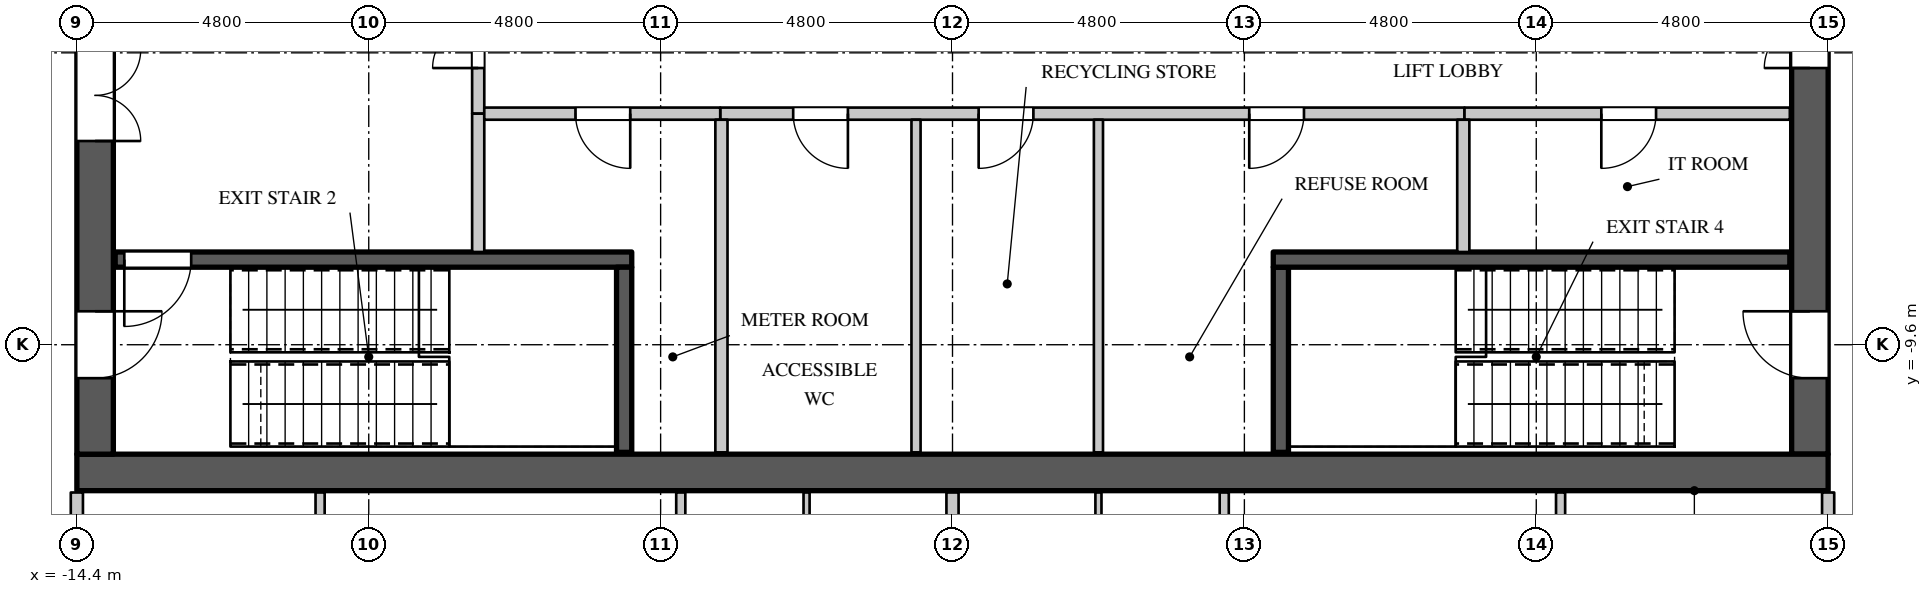
"""IFC4 building model, lengths in metres.
Left out: names, types, materials, properties, quantities, classifications, styles, units other than length and angle.
Written with IfcOpenShell. Run it as: python <this file> out.ifc"""

import sys

from ifc_helpers import new_model, si_unit, direction, frame, frame_2d, origin, place, context, subcontext, project, spatial, rectangle, extrude, element, fill, save


model = new_model("IFC4")
c1 = context("Model", 3, precision=1e-05, world=origin(), true_north=direction((0.0, 1.0)))
c2 = subcontext(c1, "Body", "Model", "MODEL_VIEW")
j1 = project(units=[si_unit("LENGTHUNIT", "METRE"), si_unit("PLANEANGLEUNIT", "RADIAN")], contexts=[c1])
p1 = place(None, origin())
s1 = spatial("IfcSite", under=j1, at=p1, CompositionType="ELEMENT")
p2 = place(p1, origin())
s2 = spatial("IfcBuilding", under=s1, at=p2, CompositionType="ELEMENT")
p3 = place(p2, frame((0.0, 0.0, 306.3)))
s3 = spatial("IfcBuildingStorey", under=s2, at=p3, CompositionType="ELEMENT", Elevation=306.3)
p4 = place(p3, frame((-14.4, -11.7, 0.0), z_axis=(0.0, 0.0, 1.0), x_axis=(1.0, 0.0, 0.0)))
e1 = element("IfcWall", 1, at=p4, inside=s3, PredefinedType="SHEAR", context=c2, shape_type="SweptSolid", body=[
    extrude(rectangle(XDim=28.8, YDim=0.6, at=frame_2d((14.4, 0.0))), origin(), (0.0, 0.0, 1.0), 4.2),
])
p5 = place(p3, frame((14.1, -11.4, 0.0), z_axis=(0.0, 0.0, 1.0), x_axis=(0.0, 1.0, 0.0)))
e2 = element("IfcWall", 2, at=p5, inside=s3, PredefinedType="SHEAR", context=c2, shape_type="SweptSolid", body=[
    extrude(rectangle(XDim=22.8, YDim=0.6, at=frame_2d((11.4, 0.0))), origin(), (0.0, 0.0, 1.0), 4.2),
])
p6 = place(p5, frame((20.45, 0.0, 0.0)))
e3 = element("IfcOpeningElement", 3, at=p6, cuts=e2, PredefinedType="OPENING", context=c2, shape_type="SweptSolid", body=[
    extrude(rectangle(XDim=1.1, YDim=2.2, at=frame_2d((0.55, 1.1))), frame((0.0, 0.31, 0.0), z_axis=(0.0, -1.0, 0.0), x_axis=(1.0, 0.0, 0.0)), (0.0, 0.0, 1.0), 0.62),
])
p7 = place(p5, frame((1.25, 0.0, 0.0)))
e4 = element("IfcOpeningElement", 4, at=p7, cuts=e2, PredefinedType="OPENING", context=c2, shape_type="SweptSolid", body=[
    extrude(rectangle(XDim=1.1, YDim=2.2, at=frame_2d((0.55, 1.1))), frame((0.0, 0.31, 0.0), z_axis=(0.0, -1.0, 0.0), x_axis=(1.0, 0.0, 0.0)), (0.0, 0.0, 1.0), 0.62),
])
p8 = place(p5, frame((14.95, 0.0, 0.0)))
e5 = element("IfcOpeningElement", 5, at=p8, cuts=e2, PredefinedType="OPENING", context=c2, shape_type="SweptSolid", body=[
    extrude(rectangle(XDim=1.5, YDim=2.4, at=frame_2d((0.75, 1.2))), frame((0.0, 0.31, 0.0), z_axis=(0.0, -1.0, 0.0), x_axis=(1.0, 0.0, 0.0)), (0.0, 0.0, 1.0), 0.62),
])
p9 = place(p5, frame((6.35, 0.0, 0.0)))
e6 = element("IfcOpeningElement", 6, at=p9, cuts=e2, PredefinedType="OPENING", context=c2, shape_type="SweptSolid", body=[
    extrude(rectangle(XDim=1.5, YDim=2.4, at=frame_2d((0.75, 1.2))), frame((0.0, 0.31, 0.0), z_axis=(0.0, -1.0, 0.0), x_axis=(1.0, 0.0, 0.0)), (0.0, 0.0, 1.0), 0.62),
])
p10 = place(p3, frame((-14.1, -11.4, 0.0), z_axis=(0.0, 0.0, 1.0), x_axis=(0.0, 1.0, 0.0)))
e7 = element("IfcWall", 7, at=p10, inside=s3, PredefinedType="SHEAR", context=c2, shape_type="SweptSolid", body=[
    extrude(rectangle(XDim=22.8, YDim=0.6, at=frame_2d((11.4, 0.0))), origin(), (0.0, 0.0, 1.0), 4.2),
])
p11 = place(p10, frame((20.45, 0.0, 0.0)))
e8 = element("IfcOpeningElement", 8, at=p11, cuts=e7, PredefinedType="OPENING", context=c2, shape_type="SweptSolid", body=[
    extrude(rectangle(XDim=1.1, YDim=2.2, at=frame_2d((0.55, 1.1))), frame((0.0, 0.31, 0.0), z_axis=(0.0, -1.0, 0.0), x_axis=(1.0, 0.0, 0.0)), (0.0, 0.0, 1.0), 0.62),
])
p12 = place(p10, frame((1.25, 0.0, 0.0)))
e9 = element("IfcOpeningElement", 9, at=p12, cuts=e7, PredefinedType="OPENING", context=c2, shape_type="SweptSolid", body=[
    extrude(rectangle(XDim=1.1, YDim=2.2, at=frame_2d((0.55, 1.1))), frame((0.0, 0.31, 0.0), z_axis=(0.0, -1.0, 0.0), x_axis=(1.0, 0.0, 0.0)), (0.0, 0.0, 1.0), 0.62),
])
p13 = place(p10, frame((16.15, 0.0, 0.0)))
e10 = element("IfcOpeningElement", 10, at=p13, cuts=e7, PredefinedType="OPENING", context=c2, shape_type="SweptSolid", body=[
    extrude(rectangle(XDim=1.5, YDim=2.4, at=frame_2d((0.75, 1.2))), frame((0.0, 0.31, 0.0), z_axis=(0.0, -1.0, 0.0), x_axis=(1.0, 0.0, 0.0)), (0.0, 0.0, 1.0), 0.62),
])
p14 = place(p10, frame((5.15, 0.0, 0.0)))
e11 = element("IfcOpeningElement", 11, at=p14, cuts=e7, PredefinedType="OPENING", context=c2, shape_type="SweptSolid", body=[
    extrude(rectangle(XDim=1.5, YDim=2.4, at=frame_2d((0.75, 1.2))), frame((0.0, 0.31, 0.0), z_axis=(0.0, -1.0, 0.0), x_axis=(1.0, 0.0, 0.0)), (0.0, 0.0, 1.0), 0.62),
])
p15 = place(p3, frame((-14.4, -14.3, 0.0), z_axis=(0.0, 0.0, 1.0), x_axis=(0.0, 1.0, 0.0)))
e12 = element("IfcWall", 12, at=p15, inside=s3, PredefinedType="PARTITIONING", context=c2, shape_type="SweptSolid", body=[
    extrude(rectangle(XDim=2.27, YDim=0.2, at=frame_2d((1.135, 0.0))), origin(), (0.0, 0.0, 1.0), 3.9),
])
p16 = place(p3, frame((-7.8, -5.8, 0.0), z_axis=(0.0, 0.0, 1.0), x_axis=(0.0, 1.0, 0.0)))
e13 = element("IfcWall", 13, at=p16, inside=s3, PredefinedType="PARTITIONING", context=c2, shape_type="SweptSolid", body=[
    extrude(rectangle(XDim=3.0, YDim=0.2, at=frame_2d((1.5, 0.0))), origin(), (0.0, 0.0, 1.0), 3.9),
])
p17 = place(p16, frame((0.75, 0.0, 0.0)))
e14 = element("IfcOpeningElement", 14, at=p17, cuts=e13, PredefinedType="OPENING", context=c2, shape_type="SweptSolid", body=[
    extrude(rectangle(XDim=1.5, YDim=2.4, at=frame_2d((0.75, 1.2))), frame((0.0, 0.11, 0.0), z_axis=(0.0, -1.0, 0.0), x_axis=(1.0, 0.0, 0.0)), (0.0, 0.0, 1.0), 0.22),
])
p18 = place(p3, frame((-3.82, -5.8, 0.0), z_axis=(0.0, 0.0, 1.0), x_axis=(1.0, 0.0, 0.0)))
e15 = element("IfcWall", 15, at=p18, inside=s3, PredefinedType="PARTITIONING", context=c2, shape_type="SweptSolid", body=[
    extrude(rectangle(XDim=12.24, YDim=0.2, at=frame_2d((6.12, 0.0))), origin(), (0.0, 0.0, 1.0), 3.9),
])
p19 = place(p18, frame((1.2, 0.0, 0.0)))
e16 = element("IfcOpeningElement", 16, at=p19, cuts=e15, PredefinedType="OPENING", context=c2, shape_type="SweptSolid", body=[
    extrude(rectangle(XDim=0.9, YDim=2.2, at=frame_2d((0.45, 1.1))), frame((0.0, 0.11, 0.0), z_axis=(0.0, -1.0, 0.0), x_axis=(1.0, 0.0, 0.0)), (0.0, 0.0, 1.0), 0.22),
])
p20 = place(p18, frame((4.25, 0.0, 0.0)))
e17 = element("IfcOpeningElement", 17, at=p20, cuts=e15, PredefinedType="OPENING", context=c2, shape_type="SweptSolid", body=[
    extrude(rectangle(XDim=0.9, YDim=2.2, at=frame_2d((0.45, 1.1))), frame((0.0, 0.11, 0.0), z_axis=(0.0, -1.0, 0.0), x_axis=(1.0, 0.0, 0.0)), (0.0, 0.0, 1.0), 0.22),
])
p21 = place(p18, frame((8.7, 0.0, 0.0)))
e18 = element("IfcOpeningElement", 18, at=p21, cuts=e15, PredefinedType="OPENING", context=c2, shape_type="SweptSolid", body=[
    extrude(rectangle(XDim=0.9, YDim=2.2, at=frame_2d((0.45, 1.1))), frame((0.0, 0.11, 0.0), z_axis=(0.0, -1.0, 0.0), x_axis=(1.0, 0.0, 0.0)), (0.0, 0.0, 1.0), 0.22),
])
p22 = place(p3, frame((14.4, -14.3, 0.0), z_axis=(0.0, 0.0, 1.0), x_axis=(0.0, 1.0, 0.0)))
e19 = element("IfcWall", 19, at=p22, inside=s3, PredefinedType="PARTITIONING", context=c2, shape_type="SweptSolid", body=[
    extrude(rectangle(XDim=2.27, YDim=0.2, at=frame_2d((1.135, 0.0))), origin(), (0.0, 0.0, 1.0), 3.9),
])
p23 = place(p3, frame((-10.4, -18.225, 0.0), z_axis=(0.0, 0.0, 1.0), x_axis=(0.0, 1.0, 0.0)))
e20 = element("IfcWall", 20, at=p23, inside=s3, PredefinedType="PARTITIONING", context=c2, shape_type="SweptSolid", body=[
    extrude(rectangle(XDim=6.195, YDim=0.15, at=frame_2d((3.098, 0.0))), origin(), (0.0, 0.0, 1.0), 3.9),
])
p24 = place(p3, frame((-4.469, -25.95, 0.0), z_axis=(0.0, 0.0, 1.0), x_axis=(0.0, 1.0, 0.0)))
e21 = element("IfcWall", 21, at=p24, inside=s3, PredefinedType="PARTITIONING", context=c2, shape_type="SweptSolid", body=[
    extrude(rectangle(XDim=13.92, YDim=0.15, at=frame_2d((6.96, 0.0))), origin(), (0.0, 0.0, 1.0), 3.3),
])
p25 = place(p24, frame((2.95, 0.0, 0.0)))
e22 = element("IfcOpeningElement", 22, at=p25, cuts=e21, PredefinedType="OPENING", context=c2, shape_type="SweptSolid", body=[
    extrude(rectangle(XDim=0.95, YDim=2.2, at=frame_2d((0.475, 1.1))), frame((0.0, 0.085, 0.0), z_axis=(0.0, -1.0, 0.0), x_axis=(1.0, 0.0, 0.0)), (0.0, 0.0, 1.0), 0.17),
])
for number, where, z_axis, x_axis in (
    (23, (-0.6, -11.37, 0.0), (0.0, 0.0, 1.0), (0.0, 1.0, 0.0)),
    (24, (2.4, -11.37, 0.0), (0.0, 0.0, 1.0), (0.0, 1.0, 0.0)),
):
    element("IfcWall", number, at=place(p3, frame(where, z_axis=z_axis, x_axis=x_axis)), inside=s3, PredefinedType="PARTITIONING", context=c2, shape_type="SweptSolid", body=[
        extrude(rectangle(XDim=5.47, YDim=0.15, at=frame_2d((2.735, 0.0))), origin(), (0.0, 0.0, 1.0), 3.9),
    ])
p26 = place(p3, frame((4.469, -25.95, 0.0), z_axis=(0.0, 0.0, 1.0), x_axis=(0.0, 1.0, 0.0)))
e25 = element("IfcWall", 25, at=p26, inside=s3, PredefinedType="PARTITIONING", context=c2, shape_type="SweptSolid", body=[
    extrude(rectangle(XDim=13.92, YDim=0.15, at=frame_2d((6.96, 0.0))), origin(), (0.0, 0.0, 1.0), 3.3),
])
p27 = place(p26, frame((2.7, 0.0, 0.0)))
e26 = element("IfcOpeningElement", 26, at=p27, cuts=e25, PredefinedType="OPENING", context=c2, shape_type="SweptSolid", body=[
    extrude(rectangle(XDim=0.95, YDim=2.2, at=frame_2d((0.475, 1.1))), frame((0.0, 0.085, 0.0), z_axis=(0.0, -1.0, 0.0), x_axis=(1.0, 0.0, 0.0)), (0.0, 0.0, 1.0), 0.17),
])
p28 = place(p3, frame((10.0, -18.675, 0.0), z_axis=(0.0, 0.0, 1.0), x_axis=(0.0, 1.0, 0.0)))
e27 = element("IfcWall", 27, at=p28, inside=s3, PredefinedType="PARTITIONING", context=c2, shape_type="SweptSolid", body=[
    extrude(rectangle(XDim=6.645, YDim=0.15, at=frame_2d((3.323, 0.0))), origin(), (0.0, 0.0, 1.0), 3.9),
])
p29 = place(p28, frame((2.85, 0.0, 0.0)))
e28 = element("IfcOpeningElement", 28, at=p29, cuts=e27, PredefinedType="OPENING", context=c2, shape_type="SweptSolid", body=[
    extrude(rectangle(XDim=0.95, YDim=2.2, at=frame_2d((0.475, 1.1))), frame((0.0, 0.085, 0.0), z_axis=(0.0, -1.0, 0.0), x_axis=(1.0, 0.0, 0.0)), (0.0, 0.0, 1.0), 0.17),
])
p30 = place(p3, frame((0.0, -26.455, 0.0), z_axis=(0.0, 0.0, 1.0), x_axis=(0.0, 1.0, 0.0)))
e29 = element("IfcWall", 29, at=p30, inside=s3, PredefinedType="PARTITIONING", context=c2, shape_type="SweptSolid", body=[
    extrude(rectangle(XDim=14.425, YDim=0.2, at=frame_2d((7.212, 0.0))), origin(), (0.0, 0.0, 1.0), 3.9),
])
p31 = place(p3, frame((-7.8, -8.075, 0.0), z_axis=(0.0, 0.0, 1.0), x_axis=(0.0, 1.0, 0.0)))
e30 = element("IfcWall", 30, at=p31, inside=s3, PredefinedType="PARTITIONING", context=c2, shape_type="SweptSolid", body=[
    extrude(rectangle(XDim=2.275, YDim=0.2, at=frame_2d((1.137, 0.0))), origin(), (0.0, 0.0, 1.0), 3.9),
])
p32 = place(p3, frame((-7.7, -5.8, 0.0), z_axis=(0.0, 0.0, 1.0), x_axis=(1.0, 0.0, 0.0)))
e31 = element("IfcWall", 31, at=p32, inside=s3, PredefinedType="PARTITIONING", context=c2, shape_type="SweptSolid", body=[
    extrude(rectangle(XDim=3.88, YDim=0.2, at=frame_2d((1.94, 0.0))), origin(), (0.0, 0.0, 1.0), 3.9),
])
p33 = place(p32, frame((1.5, 0.0, 0.0)))
e32 = element("IfcOpeningElement", 32, at=p33, cuts=e31, PredefinedType="OPENING", context=c2, shape_type="SweptSolid", body=[
    extrude(rectangle(XDim=0.9, YDim=2.2, at=frame_2d((0.45, 1.1))), frame((0.0, 0.11, 0.0), z_axis=(0.0, -1.0, 0.0), x_axis=(1.0, 0.0, 0.0)), (0.0, 0.0, 1.0), 0.22),
])
p34 = place(p3, frame((-3.8, -11.37, 0.0), z_axis=(0.0, 0.0, 1.0), x_axis=(0.0, 1.0, 0.0)))
e33 = element("IfcWall", 33, at=p34, inside=s3, PredefinedType="PARTITIONING", context=c2, shape_type="SweptSolid", body=[
    extrude(rectangle(XDim=5.47, YDim=0.2, at=frame_2d((2.735, 0.0))), origin(), (0.0, 0.0, 1.0), 3.9),
])
p35 = place(p3, frame((8.42, -5.8, 0.0), z_axis=(0.0, 0.0, 1.0), x_axis=(1.0, 0.0, 0.0)))
e34 = element("IfcWall", 34, at=p35, inside=s3, PredefinedType="PARTITIONING", context=c2, shape_type="SweptSolid", body=[
    extrude(rectangle(XDim=5.35, YDim=0.2, at=frame_2d((2.675, 0.0))), origin(), (0.0, 0.0, 1.0), 3.9),
])
p36 = place(p35, frame((2.25, 0.0, 0.0)))
e35 = element("IfcOpeningElement", 35, at=p36, cuts=e34, PredefinedType="OPENING", context=c2, shape_type="SweptSolid", body=[
    extrude(rectangle(XDim=0.9, YDim=2.2, at=frame_2d((0.45, 1.1))), frame((0.0, 0.11, 0.0), z_axis=(0.0, -1.0, 0.0), x_axis=(1.0, 0.0, 0.0)), (0.0, 0.0, 1.0), 0.22),
])
p37 = place(p3, frame((8.4, -8.075, 0.0), z_axis=(0.0, 0.0, 1.0), x_axis=(0.0, 1.0, 0.0)))
e36 = element("IfcWall", 36, at=p37, inside=s3, PredefinedType="PARTITIONING", context=c2, shape_type="SweptSolid", body=[
    extrude(rectangle(XDim=2.175, YDim=0.2, at=frame_2d((1.087, 0.0))), origin(), (0.0, 0.0, 1.0), 3.9),
])
p38 = place(p3, frame((-13.77, -8.2, 0.0), z_axis=(0.0, 0.0, 1.0), x_axis=(1.0, 0.0, 0.0)))
e37 = element("IfcWall", 37, at=p38, inside=s3, PredefinedType="SHEAR", context=c2, shape_type="SweptSolid", body=[
    extrude(rectangle(XDim=8.495, YDim=0.25, at=frame_2d((4.248, 0.0))), origin(), (0.0, 0.0, 1.0), 3.9),
])
p39 = place(p38, frame((0.15, 0.0, 0.0)))
e38 = element("IfcOpeningElement", 38, at=p39, cuts=e37, PredefinedType="OPENING", context=c2, shape_type="SweptSolid", body=[
    extrude(rectangle(XDim=1.1, YDim=2.2, at=frame_2d((0.55, 1.1))), frame((0.0, 0.135, 0.0), z_axis=(0.0, -1.0, 0.0), x_axis=(1.0, 0.0, 0.0)), (0.0, 0.0, 1.0), 0.27),
])
for number, where, z_axis, x_axis in (
    (39, (-5.4, -11.37, 0.0), (0.0, 0.0, 1.0), (0.0, 1.0, 0.0)),
    (40, (5.4, -11.37, 0.0), (0.0, 0.0, 1.0), (0.0, 1.0, 0.0)),
):
    element("IfcWall", number, at=place(p3, frame(where, z_axis=z_axis, x_axis=x_axis)), inside=s3, PredefinedType="SHEAR", context=c2, shape_type="SweptSolid", body=[
        extrude(rectangle(XDim=3.045, YDim=0.25, at=frame_2d((1.522, 0.0))), origin(), (0.0, 0.0, 1.0), 3.9),
    ])
p40 = place(p3, frame((5.275, -8.2, 0.0), z_axis=(0.0, 0.0, 1.0), x_axis=(1.0, 0.0, 0.0)))
e41 = element("IfcWall", 41, at=p40, inside=s3, PredefinedType="SHEAR", context=c2, shape_type="SweptSolid", body=[
    extrude(rectangle(XDim=8.495, YDim=0.25, at=frame_2d((4.248, 0.0))), origin(), (0.0, 0.0, 1.0), 3.9),
])
p41 = place(p3, frame((-2.4, -18.675, 0.0), z_axis=(0.0, 0.0, 1.0), x_axis=(0.0, 1.0, 0.0)))
e42 = element("IfcWall", 42, at=p41, inside=s3, PredefinedType="PARTITIONING", context=c2, shape_type="SweptSolid", body=[
    extrude(rectangle(XDim=6.645, YDim=0.1, at=frame_2d((3.323, 0.0))), origin(), (0.0, 0.0, 1.0), 3.9),
])
p42 = place(p3, frame((2.4, -19.125, 0.0), z_axis=(0.0, 0.0, 1.0), x_axis=(0.0, 1.0, 0.0)))
e43 = element("IfcWall", 43, at=p42, inside=s3, PredefinedType="PARTITIONING", context=c2, shape_type="SweptSolid", body=[
    extrude(rectangle(XDim=7.095, YDim=0.1, at=frame_2d((3.547, 0.0))), origin(), (0.0, 0.0, 1.0), 3.9),
])
p43 = place(p33, origin())
e44 = element("IfcDoor", 44, at=p43, inside=s3, OperationType="SINGLE_SWING_LEFT", PredefinedType="DOOR", context=c2, shape_type="SweptSolid", body=[
    extrude(rectangle(XDim=0.9, YDim=2.2, at=frame_2d((0.45, 1.1))), frame((0.0, 0.025, 0.0), z_axis=(0.0, -1.0, 0.0), x_axis=(1.0, 0.0, 0.0)), (0.0, 0.0, 1.0), 0.05),
])
fill(e32, e44)
p44 = place(p19, origin())
e45 = element("IfcDoor", 45, at=p44, inside=s3, OperationType="SINGLE_SWING_LEFT", PredefinedType="DOOR", context=c2, shape_type="SweptSolid", body=[
    extrude(rectangle(XDim=0.9, YDim=2.2, at=frame_2d((0.45, 1.1))), frame((0.0, 0.025, 0.0), z_axis=(0.0, -1.0, 0.0), x_axis=(1.0, 0.0, 0.0)), (0.0, 0.0, 1.0), 0.05),
])
fill(e16, e45)
p45 = place(p20, origin())
e46 = element("IfcDoor", 46, at=p45, inside=s3, OperationType="SINGLE_SWING_RIGHT", PredefinedType="DOOR", context=c2, shape_type="SweptSolid", body=[
    extrude(rectangle(XDim=0.9, YDim=2.2, at=frame_2d((0.45, 1.1))), frame((0.0, 0.025, 0.0), z_axis=(0.0, -1.0, 0.0), x_axis=(1.0, 0.0, 0.0)), (0.0, 0.0, 1.0), 0.05),
])
fill(e17, e46)
p46 = place(p21, origin())
e47 = element("IfcDoor", 47, at=p46, inside=s3, OperationType="SINGLE_SWING_RIGHT", PredefinedType="DOOR", context=c2, shape_type="SweptSolid", body=[
    extrude(rectangle(XDim=0.9, YDim=2.2, at=frame_2d((0.45, 1.1))), frame((0.0, 0.025, 0.0), z_axis=(0.0, -1.0, 0.0), x_axis=(1.0, 0.0, 0.0)), (0.0, 0.0, 1.0), 0.05),
])
fill(e18, e47)
p47 = place(p36, origin())
e48 = element("IfcDoor", 48, at=p47, inside=s3, OperationType="SINGLE_SWING_RIGHT", PredefinedType="DOOR", context=c2, shape_type="SweptSolid", body=[
    extrude(rectangle(XDim=0.9, YDim=2.2, at=frame_2d((0.45, 1.1))), frame((0.0, 0.025, 0.0), z_axis=(0.0, -1.0, 0.0), x_axis=(1.0, 0.0, 0.0)), (0.0, 0.0, 1.0), 0.05),
])
fill(e35, e48)
p48 = place(p39, origin())
e49 = element("IfcDoor", 49, at=p48, inside=s3, OperationType="SINGLE_SWING_RIGHT", PredefinedType="DOOR", context=c2, shape_type="SweptSolid", body=[
    extrude(rectangle(XDim=1.1, YDim=2.2, at=frame_2d((0.55, 1.1))), frame((0.0, 0.025, 0.0), z_axis=(0.0, -1.0, 0.0), x_axis=(1.0, 0.0, 0.0)), (0.0, 0.0, 1.0), 0.05),
])
fill(e38, e49)
p49 = place(p17, origin())
e50 = element("IfcDoor", 50, at=p49, inside=s3, OperationType="DOUBLE_DOOR_SINGLE_SWING", PredefinedType="DOOR", context=c2, shape_type="SweptSolid", body=[
    extrude(rectangle(XDim=1.5, YDim=2.4, at=frame_2d((0.75, 1.2))), frame((0.0, 0.025, 0.0), z_axis=(0.0, -1.0, 0.0), x_axis=(1.0, 0.0, 0.0)), (0.0, 0.0, 1.0), 0.05),
])
fill(e14, e50)
p50 = place(p12, origin())
e51 = element("IfcDoor", 51, at=p50, inside=s3, OperationType="SINGLE_SWING_LEFT", PredefinedType="DOOR", context=c2, shape_type="SweptSolid", body=[
    extrude(rectangle(XDim=1.1, YDim=2.2, at=frame_2d((0.55, 1.1))), frame((0.0, -0.245, 0.0), z_axis=(0.0, -1.0, 0.0), x_axis=(1.0, 0.0, 0.0)), (0.0, 0.0, 1.0), 0.05),
])
fill(e9, e51)
p51 = place(p7, origin())
e52 = element("IfcDoor", 52, at=p51, inside=s3, OperationType="SINGLE_SWING_RIGHT", PredefinedType="DOOR", context=c2, shape_type="SweptSolid", body=[
    extrude(rectangle(XDim=1.1, YDim=2.2, at=frame_2d((0.55, 1.1))), frame((0.0, 0.295, 0.0), z_axis=(0.0, -1.0, 0.0), x_axis=(1.0, 0.0, 0.0)), (0.0, 0.0, 1.0), 0.05),
])
fill(e4, e52)
p52 = place(p14, origin())
e53 = element("IfcDoor", 53, at=p52, inside=s3, OperationType="DOUBLE_DOOR_SINGLE_SWING", PredefinedType="DOOR", context=c2, shape_type="SweptSolid", body=[
    extrude(rectangle(XDim=1.5, YDim=2.4, at=frame_2d((0.75, 1.2))), frame((0.0, -0.245, 0.0), z_axis=(0.0, -1.0, 0.0), x_axis=(1.0, 0.0, 0.0)), (0.0, 0.0, 1.0), 0.05),
])
fill(e11, e53)
p53 = place(p9, origin())
e54 = element("IfcDoor", 54, at=p53, inside=s3, OperationType="DOUBLE_DOOR_SINGLE_SWING", PredefinedType="DOOR", context=c2, shape_type="SweptSolid", body=[
    extrude(rectangle(XDim=1.5, YDim=2.4, at=frame_2d((0.75, 1.2))), frame((0.0, 0.295, 0.0), z_axis=(0.0, -1.0, 0.0), x_axis=(1.0, 0.0, 0.0)), (0.0, 0.0, 1.0), 0.05),
])
fill(e6, e54)
save(model, sys.argv[1])
